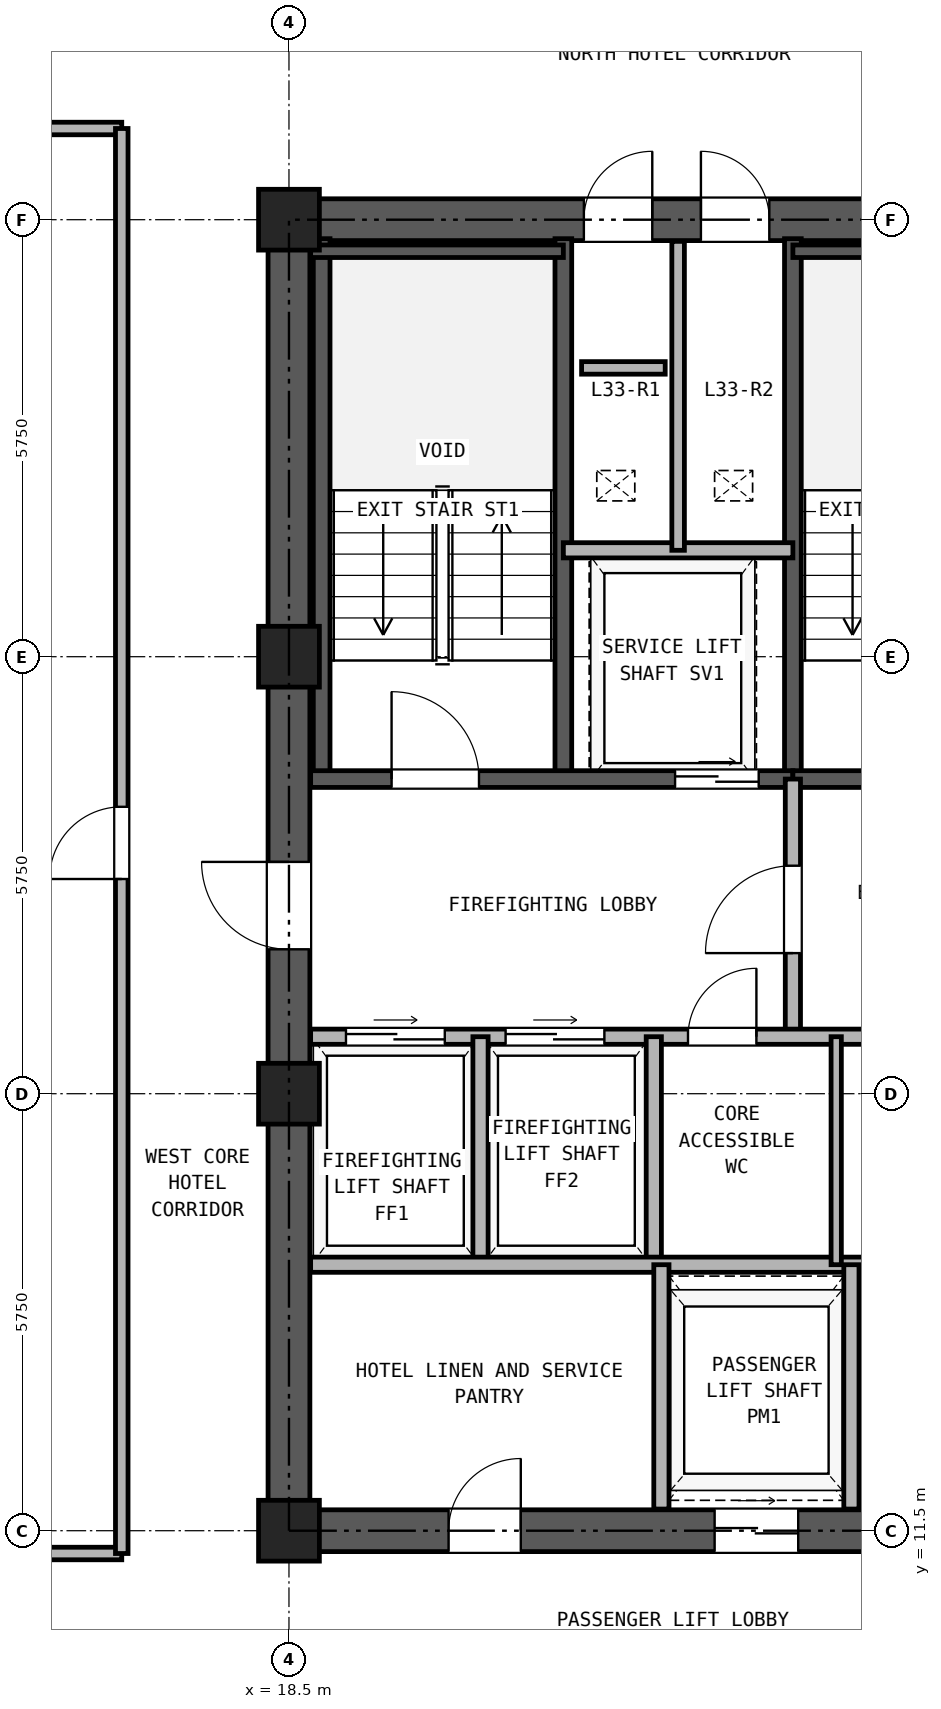
"""IFC4 building model, lengths in metres.
Left out: names, types, materials, properties, quantities, classifications, styles, units other than length and angle.
Written with IfcOpenShell. Run it as: python <this file> out.ifc"""

import sys

from ifc_helpers import new_model, si_unit, direction, frame, frame_2d, origin, origin_2d, place, context, subcontext, project, spatial, rectangle, hollow_rectangle, extrude, source, transform, mapped, element, fill, save


model = new_model("IFC4")
c1 = context("Model", 3, precision=1e-05, world=origin(), true_north=direction((0.0, 1.0)))
c2 = subcontext(c1, "Body", "Model", "MODEL_VIEW")
j1 = project(units=[si_unit("LENGTHUNIT", "METRE"), si_unit("PLANEANGLEUNIT", "RADIAN")], contexts=[c1])
p1 = place(None, origin())
s1 = spatial("IfcSite", under=j1, at=p1, CompositionType="ELEMENT")
p2 = place(p1, origin())
s2 = spatial("IfcBuilding", under=s1, at=p2, CompositionType="ELEMENT")
p3 = place(p2, frame((0.0, 0.0, 121.5)))
s3 = spatial("IfcBuildingStorey", under=s2, at=p3, CompositionType="ELEMENT", Elevation=121.5)
m1 = source(origin(), c2, "Body", "SweptSolid", [
    extrude(hollow_rectangle(XDim=0.8, YDim=0.8, WallThickness=0.045, at=origin_2d()), origin(), (0.0, 0.0, 1.0), 2.95),
])
for number, where, z_axis, x_axis in (
    (1, (18.5, 11.5, 0.0), (0.0, 0.0, 1.0), (1.0, 0.0, 0.0)),
    (2, (18.5, 17.25, 0.0), (0.0, 0.0, 1.0), (1.0, 0.0, 0.0)),
    (3, (18.5, 23.0, 0.0), (0.0, 0.0, 1.0), (1.0, 0.0, 0.0)),
    (4, (18.5, 28.75, 0.0), (0.0, 0.0, 1.0), (1.0, 0.0, 0.0)),
):
    element("IfcColumn", number, at=place(p3, frame(where, z_axis=z_axis, x_axis=x_axis)), inside=s3, PredefinedType="COLUMN", context=c2, shape_type="MappedRepresentation", body=[
        mapped(m1, transform((0.0, 0.0, 0.0), x_axis=(1.0, 0.0, 0.0), y_axis=(0.0, 1.0, 0.0), z_axis=(0.0, 0.0, 1.0), scale=1.0)),
    ])
p4 = place(p3, frame((18.225, 11.5, 0.0), z_axis=(0.0, 0.0, 1.0), x_axis=(1.0, 0.0, 0.0)))
e5 = element("IfcWall", 5, at=p4, inside=s3, PredefinedType="SHEAR", context=c2, shape_type="SweptSolid", body=[
    extrude(rectangle(XDim=10.55, YDim=0.55, at=frame_2d((5.275, 0.0))), origin(), (0.0, 0.0, 1.0), 2.95),
])
p5 = place(p4, frame((2.375, 0.0, 0.0)))
e6 = element("IfcOpeningElement", 6, at=p5, cuts=e5, PredefinedType="OPENING", context=c2, shape_type="SweptSolid", body=[
    extrude(rectangle(XDim=0.95, YDim=2.15, at=frame_2d((0.475, 1.075))), frame((0.0, 0.285, 0.0), z_axis=(0.0, -1.0, 0.0), x_axis=(1.0, 0.0, 0.0)), (0.0, 0.0, 1.0), 0.57),
])
p6 = place(p4, frame((5.875, 0.0, 0.0)))
e7 = element("IfcOpeningElement", 7, at=p6, cuts=e5, PredefinedType="OPENING", context=c2, shape_type="SweptSolid", body=[
    extrude(rectangle(XDim=1.1, YDim=2.25, at=frame_2d((0.55, 1.125))), frame((0.0, 0.285, 0.0), z_axis=(0.0, -1.0, 0.0), x_axis=(1.0, 0.0, 0.0)), (0.0, 0.0, 1.0), 0.57),
])
p7 = place(p4, frame((8.275, 0.0, 0.0)))
e8 = element("IfcOpeningElement", 8, at=p7, cuts=e5, PredefinedType="OPENING", context=c2, shape_type="SweptSolid", body=[
    extrude(rectangle(XDim=1.1, YDim=2.25, at=frame_2d((0.55, 1.125))), frame((0.0, 0.285, 0.0), z_axis=(0.0, -1.0, 0.0), x_axis=(1.0, 0.0, 0.0)), (0.0, 0.0, 1.0), 0.57),
])
p8 = place(p3, frame((18.225, 28.75, 0.0), z_axis=(0.0, 0.0, 1.0), x_axis=(1.0, 0.0, 0.0)))
e9 = element("IfcWall", 9, at=p8, inside=s3, PredefinedType="SHEAR", context=c2, shape_type="SweptSolid", body=[
    extrude(rectangle(XDim=10.55, YDim=0.55, at=frame_2d((5.275, 0.0))), origin(), (0.0, 0.0, 1.0), 2.95),
])
p9 = place(p8, frame((4.155, 0.0, 0.0)))
e10 = element("IfcOpeningElement", 10, at=p9, cuts=e9, PredefinedType="OPENING", context=c2, shape_type="SweptSolid", body=[
    extrude(rectangle(XDim=0.9, YDim=2.05, at=frame_2d((0.45, 1.025))), frame((0.0, 0.285, 0.0), z_axis=(0.0, -1.0, 0.0), x_axis=(1.0, 0.0, 0.0)), (0.0, 0.0, 1.0), 0.57),
])
p10 = place(p8, frame((5.695, 0.0, 0.0)))
e11 = element("IfcOpeningElement", 11, at=p10, cuts=e9, PredefinedType="OPENING", context=c2, shape_type="SweptSolid", body=[
    extrude(rectangle(XDim=0.9, YDim=2.05, at=frame_2d((0.45, 1.025))), frame((0.0, 0.285, 0.0), z_axis=(0.0, -1.0, 0.0), x_axis=(1.0, 0.0, 0.0)), (0.0, 0.0, 1.0), 0.57),
])
p11 = place(p3, frame((18.5, 11.775, 0.0), z_axis=(0.0, 0.0, 1.0), x_axis=(0.0, 1.0, 0.0)))
e12 = element("IfcWall", 12, at=p11, inside=s3, PredefinedType="SHEAR", context=c2, shape_type="SweptSolid", body=[
    extrude(rectangle(XDim=16.7, YDim=0.55, at=frame_2d((8.35, 0.0))), origin(), (0.0, 0.0, 1.0), 2.95),
])
p12 = place(p11, frame((7.375, 0.0, 0.0)))
e13 = element("IfcOpeningElement", 13, at=p12, cuts=e12, PredefinedType="OPENING", context=c2, shape_type="SweptSolid", body=[
    extrude(rectangle(XDim=1.15, YDim=2.2, at=frame_2d((0.575, 1.1))), frame((0.0, 0.285, 0.0), z_axis=(0.0, -1.0, 0.0), x_axis=(1.0, 0.0, 0.0)), (0.0, 0.0, 1.0), 0.57),
])
for number, where, z_axis, x_axis in (
    (14, (18.93, 21.39, 0.0), (0.0, 0.0, 1.0), (0.0, 1.0, 0.0)),
    (15, (22.11, 21.39, 0.0), (0.0, 0.0, 1.0), (0.0, 1.0, 0.0)),
    (16, (25.13, 21.39, 0.0), (0.0, 0.0, 1.0), (0.0, 1.0, 0.0)),
):
    element("IfcWall", number, at=place(p3, frame(where, z_axis=z_axis, x_axis=x_axis)), inside=s3, PredefinedType="SOLIDWALL", context=c2, shape_type="SweptSolid", body=[
        extrude(rectangle(XDim=7.11, YDim=0.22, at=frame_2d((3.555, 0.0))), origin(), (0.0, 0.0, 1.0), 2.95),
    ])
p13 = place(p3, frame((18.785, 28.335, 0.0), z_axis=(0.0, 0.0, 1.0), x_axis=(1.0, 0.0, 0.0)))
e17 = element("IfcWall", 17, at=p13, inside=s3, PredefinedType="PARTITIONING", context=c2, shape_type="SweptSolid", body=[
    extrude(rectangle(XDim=3.325, YDim=0.165, at=frame_2d((1.663, 0.0))), origin(), (0.0, 0.0, 1.0), 2.95),
])
p14 = place(p3, frame((25.13, 28.335, 0.0), z_axis=(0.0, 0.0, 1.0), x_axis=(1.0, 0.0, 0.0)))
e18 = element("IfcWall", 18, at=p14, inside=s3, PredefinedType="PARTITIONING", context=c2, shape_type="SweptSolid", body=[
    extrude(rectangle(XDim=3.085, YDim=0.165, at=frame_2d((1.542, 0.0))), origin(), (0.0, 0.0, 1.0), 2.95),
])
p15 = place(p3, frame((18.785, 21.39, 0.0), z_axis=(0.0, 0.0, 1.0), x_axis=(1.0, 0.0, 0.0)))
e19 = element("IfcWall", 19, at=p15, inside=s3, PredefinedType="SOLIDWALL", context=c2, shape_type="SweptSolid", body=[
    extrude(rectangle(XDim=6.345, YDim=0.22, at=frame_2d((3.172, 0.0))), origin(), (0.0, 0.0, 1.0), 2.95),
])
p16 = place(p15, frame((1.065, 0.0, 0.0)))
e20 = element("IfcOpeningElement", 20, at=p16, cuts=e19, PredefinedType="OPENING", context=c2, shape_type="SweptSolid", body=[
    extrude(rectangle(XDim=1.15, YDim=2.2, at=frame_2d((0.575, 1.1))), frame((0.0, 0.12, 0.0), z_axis=(0.0, -1.0, 0.0), x_axis=(1.0, 0.0, 0.0)), (0.0, 0.0, 1.0), 0.24),
])
p17 = place(p15, frame((4.795, 0.0, 0.0)))
e21 = element("IfcOpeningElement", 21, at=p17, cuts=e19, PredefinedType="OPENING", context=c2, shape_type="SweptSolid", body=[
    extrude(rectangle(XDim=1.1, YDim=2.25, at=frame_2d((0.55, 1.125))), frame((0.0, 0.12, 0.0), z_axis=(0.0, -1.0, 0.0), x_axis=(1.0, 0.0, 0.0)), (0.0, 0.0, 1.0), 0.24),
])
p18 = place(p3, frame((25.13, 21.39, 0.0), z_axis=(0.0, 0.0, 1.0), x_axis=(1.0, 0.0, 0.0)))
e22 = element("IfcWall", 22, at=p18, inside=s3, PredefinedType="SOLIDWALL", context=c2, shape_type="SweptSolid", body=[
    extrude(rectangle(XDim=3.085, YDim=0.22, at=frame_2d((1.542, 0.0))), origin(), (0.0, 0.0, 1.0), 2.95),
])
p19 = place(p18, frame((0.92, 0.0, 0.0)))
e23 = element("IfcOpeningElement", 23, at=p19, cuts=e22, PredefinedType="OPENING", context=c2, shape_type="SweptSolid", body=[
    extrude(rectangle(XDim=1.15, YDim=2.2, at=frame_2d((0.575, 1.1))), frame((0.0, 0.12, 0.0), z_axis=(0.0, -1.0, 0.0), x_axis=(1.0, 0.0, 0.0)), (0.0, 0.0, 1.0), 0.24),
])
p20 = place(p3, frame((22.11, 24.4, 0.0), z_axis=(0.0, 0.0, 1.0), x_axis=(1.0, 0.0, 0.0)))
e24 = element("IfcWall", 24, at=p20, inside=s3, PredefinedType="PARTITIONING", context=c2, shape_type="SweptSolid", body=[
    extrude(rectangle(XDim=3.02, YDim=0.2, at=frame_2d((1.51, 0.0))), origin(), (0.0, 0.0, 1.0), 2.95),
])
p21 = place(p3, frame((23.62, 24.4, 0.0), z_axis=(0.0, 0.0, 1.0), x_axis=(0.0, 1.0, 0.0)))
e25 = element("IfcWall", 25, at=p21, inside=s3, PredefinedType="PARTITIONING", context=c2, shape_type="SweptSolid", body=[
    extrude(rectangle(XDim=4.065, YDim=0.165, at=frame_2d((2.033, 0.0))), origin(), (0.0, 0.0, 1.0), 2.95),
])
p22 = place(p3, frame((25.13, 18.0, 0.0), z_axis=(0.0, 0.0, 1.0), x_axis=(0.0, 1.0, 0.0)))
e26 = element("IfcWall", 26, at=p22, inside=s3, PredefinedType="PARTITIONING", context=c2, shape_type="SweptSolid", body=[
    extrude(rectangle(XDim=3.39, YDim=0.2, at=frame_2d((1.695, 0.0))), origin(), (0.0, 0.0, 1.0), 2.95),
])
p23 = place(p22, frame((1.1, 0.0, 0.0)))
e27 = element("IfcOpeningElement", 27, at=p23, cuts=e26, PredefinedType="OPENING", context=c2, shape_type="SweptSolid", body=[
    extrude(rectangle(XDim=1.15, YDim=2.2, at=frame_2d((0.575, 1.1))), frame((0.0, 0.11, 0.0), z_axis=(0.0, -1.0, 0.0), x_axis=(1.0, 0.0, 0.0)), (0.0, 0.0, 1.0), 0.22),
])
p24 = place(p3, frame((18.785, 18.0, 0.0), z_axis=(0.0, 0.0, 1.0), x_axis=(1.0, 0.0, 0.0)))
e28 = element("IfcWall", 28, at=p24, inside=s3, PredefinedType="PARTITIONING", context=c2, shape_type="SweptSolid", body=[
    extrude(rectangle(XDim=9.43, YDim=0.2, at=frame_2d((4.715, 0.0))), origin(), (0.0, 0.0, 1.0), 2.95),
])
p25 = place(p24, frame((0.465, 0.0, 0.0)))
e29 = element("IfcOpeningElement", 29, at=p25, cuts=e28, PredefinedType="OPENING", context=c2, shape_type="SweptSolid", body=[
    extrude(rectangle(XDim=1.3, YDim=2.3, at=frame_2d((0.65, 1.15))), frame((0.0, 0.11, 0.0), z_axis=(0.0, -1.0, 0.0), x_axis=(1.0, 0.0, 0.0)), (0.0, 0.0, 1.0), 0.22),
])
p26 = place(p24, frame((2.565, 0.0, 0.0)))
e30 = element("IfcOpeningElement", 30, at=p26, cuts=e28, PredefinedType="OPENING", context=c2, shape_type="SweptSolid", body=[
    extrude(rectangle(XDim=1.3, YDim=2.3, at=frame_2d((0.65, 1.15))), frame((0.0, 0.11, 0.0), z_axis=(0.0, -1.0, 0.0), x_axis=(1.0, 0.0, 0.0)), (0.0, 0.0, 1.0), 0.22),
])
p27 = place(p24, frame((4.965, 0.0, 0.0)))
e31 = element("IfcOpeningElement", 31, at=p27, cuts=e28, PredefinedType="OPENING", context=c2, shape_type="SweptSolid", body=[
    extrude(rectangle(XDim=0.9, YDim=2.05, at=frame_2d((0.45, 1.025))), frame((0.0, 0.11, 0.0), z_axis=(0.0, -1.0, 0.0), x_axis=(1.0, 0.0, 0.0)), (0.0, 0.0, 1.0), 0.22),
])
p28 = place(p24, frame((7.665, 0.0, 0.0)))
e32 = element("IfcOpeningElement", 32, at=p28, cuts=e28, PredefinedType="OPENING", context=c2, shape_type="SweptSolid", body=[
    extrude(rectangle(XDim=0.9, YDim=2.05, at=frame_2d((0.45, 1.025))), frame((0.0, 0.11, 0.0), z_axis=(0.0, -1.0, 0.0), x_axis=(1.0, 0.0, 0.0)), (0.0, 0.0, 1.0), 0.22),
])
for number, where, z_axis, x_axis in (
    (33, (21.02, 15.0, 0.0), (0.0, 0.0, 1.0), (0.0, 1.0, 0.0)),
    (34, (23.3, 15.0, 0.0), (0.0, 0.0, 1.0), (0.0, 1.0, 0.0)),
):
    element("IfcWall", number, at=place(p3, frame(where, z_axis=z_axis, x_axis=x_axis)), inside=s3, PredefinedType="PARTITIONING", context=c2, shape_type="SweptSolid", body=[
        extrude(rectangle(XDim=3.0, YDim=0.2, at=frame_2d((1.5, 0.0))), origin(), (0.0, 0.0, 1.0), 2.95),
    ])
p29 = place(p3, frame((18.785, 15.0, 0.0), z_axis=(0.0, 0.0, 1.0), x_axis=(1.0, 0.0, 0.0)))
e35 = element("IfcWall", 35, at=p29, inside=s3, PredefinedType="PARTITIONING", context=c2, shape_type="SweptSolid", body=[
    extrude(rectangle(XDim=9.43, YDim=0.2, at=frame_2d((4.715, 0.0))), origin(), (0.0, 0.0, 1.0), 2.95),
])
p30 = place(p3, frame((25.7, 15.0, 0.0), z_axis=(0.0, 0.0, 1.0), x_axis=(0.0, 1.0, 0.0)))
e36 = element("IfcWall", 36, at=p30, inside=s3, PredefinedType="PARTITIONING", context=c2, shape_type="SweptSolid", body=[
    extrude(rectangle(XDim=3.0, YDim=0.135, at=frame_2d((1.5, 0.0))), origin(), (0.0, 0.0, 1.0), 2.95),
])
for number, where, z_axis, x_axis in (
    (37, (23.4, 11.785, 0.0), (0.0, 0.0, 1.0), (0.0, 1.0, 0.0)),
    (38, (25.9, 11.785, 0.0), (0.0, 0.0, 1.0), (0.0, 1.0, 0.0)),
):
    element("IfcWall", number, at=place(p3, frame(where, z_axis=z_axis, x_axis=x_axis)), inside=s3, PredefinedType="PARTITIONING", context=c2, shape_type="SweptSolid", body=[
        extrude(rectangle(XDim=3.215, YDim=0.2, at=frame_2d((1.607, 0.0))), origin(), (0.0, 0.0, 1.0), 2.95),
    ])
for number, where, z_axis, x_axis in (
    (39, (7.2, 11.2, 0.0), (0.0, 0.0, 1.0), (1.0, 0.0, 0.0)),
    (40, (7.2, 29.95, 0.0), (0.0, 0.0, 1.0), (1.0, 0.0, 0.0)),
):
    element("IfcWall", number, at=place(p3, frame(where, z_axis=z_axis, x_axis=x_axis)), inside=s3, PredefinedType="PARTITIONING", context=c2, shape_type="SweptSolid", body=[
        extrude(rectangle(XDim=9.1, YDim=0.165, at=frame_2d((4.55, 0.0))), origin(), (0.0, 0.0, 1.0), 2.95),
    ])
p31 = place(p3, frame((16.3, 11.2, 0.0), z_axis=(0.0, 0.0, 1.0), x_axis=(0.0, 1.0, 0.0)))
e41 = element("IfcWall", 41, at=p31, inside=s3, PredefinedType="PARTITIONING", context=c2, shape_type="SweptSolid", body=[
    extrude(rectangle(XDim=18.75, YDim=0.165, at=frame_2d((9.375, 0.0))), origin(), (0.0, 0.0, 1.0), 2.95),
])
p32 = place(p31, frame((8.875, 0.0, 0.0)))
e42 = element("IfcOpeningElement", 42, at=p32, cuts=e41, PredefinedType="OPENING", context=c2, shape_type="SweptSolid", body=[
    extrude(rectangle(XDim=0.95, YDim=2.15, at=frame_2d((0.475, 1.075))), frame((0.0, 0.093, 0.0), z_axis=(0.0, -1.0, 0.0), x_axis=(1.0, 0.0, 0.0)), (0.0, 0.0, 1.0), 0.185),
])
p33 = place(p3, frame((22.35, 26.8, 0.0), z_axis=(0.0, 0.0, 1.0), x_axis=(1.0, 0.0, 0.0)))
e43 = element("IfcWall", 43, at=p33, inside=s3, PredefinedType="PARTITIONING", context=c2, shape_type="SweptSolid", body=[
    extrude(rectangle(XDim=1.1, YDim=0.165, at=frame_2d((0.55, 0.0))), origin(), (0.0, 0.0, 1.0), 2.95),
])
p34 = place(p16, frame((1.15, 0.0, 0.0), z_axis=(0.0, 0.0, 1.0), x_axis=(-1.0, 0.0, 0.0)))
e44 = element("IfcDoor", 44, at=p34, inside=s3, OperationType="SINGLE_SWING_LEFT", PredefinedType="DOOR", context=c2, shape_type="SweptSolid", body=[
    extrude(rectangle(XDim=1.15, YDim=2.2, at=frame_2d((0.575, 1.1))), frame((0.0, 0.025, 0.0), z_axis=(0.0, -1.0, 0.0), x_axis=(1.0, 0.0, 0.0)), (0.0, 0.0, 1.0), 0.05),
])
fill(e20, e44)
p35 = place(p17, frame((1.1, 0.0, 0.0), z_axis=(0.0, 0.0, 1.0), x_axis=(-1.0, 0.0, 0.0)))
e45 = element("IfcDoor", 45, at=p35, inside=s3, OperationType="DOUBLE_DOOR_SLIDING", PredefinedType="DOOR", context=c2, shape_type="SweptSolid", body=[
    extrude(rectangle(XDim=1.1, YDim=2.25, at=frame_2d((0.55, 1.125))), frame((0.0, 0.025, 0.0), z_axis=(0.0, -1.0, 0.0), x_axis=(1.0, 0.0, 0.0)), (0.0, 0.0, 1.0), 0.05),
])
fill(e21, e45)
p36 = place(p23, origin())
e46 = element("IfcDoor", 46, at=p36, inside=s3, OperationType="SINGLE_SWING_LEFT", PredefinedType="DOOR", context=c2, shape_type="SweptSolid", body=[
    extrude(rectangle(XDim=1.15, YDim=2.2, at=frame_2d((0.575, 1.1))), frame((0.0, 0.025, 0.0), z_axis=(0.0, -1.0, 0.0), x_axis=(1.0, 0.0, 0.0)), (0.0, 0.0, 1.0), 0.05),
])
fill(e27, e46)
p37 = place(p25, origin())
e47 = element("IfcDoor", 47, at=p37, inside=s3, OperationType="DOUBLE_DOOR_SLIDING", PredefinedType="DOOR", context=c2, shape_type="SweptSolid", body=[
    extrude(rectangle(XDim=1.3, YDim=2.3, at=frame_2d((0.65, 1.15))), frame((0.0, 0.025, 0.0), z_axis=(0.0, -1.0, 0.0), x_axis=(1.0, 0.0, 0.0)), (0.0, 0.0, 1.0), 0.05),
])
fill(e29, e47)
p38 = place(p26, origin())
e48 = element("IfcDoor", 48, at=p38, inside=s3, OperationType="DOUBLE_DOOR_SLIDING", PredefinedType="DOOR", context=c2, shape_type="SweptSolid", body=[
    extrude(rectangle(XDim=1.3, YDim=2.3, at=frame_2d((0.65, 1.15))), frame((0.0, 0.025, 0.0), z_axis=(0.0, -1.0, 0.0), x_axis=(1.0, 0.0, 0.0)), (0.0, 0.0, 1.0), 0.05),
])
fill(e30, e48)
p39 = place(p27, frame((0.9, 0.0, 0.0), z_axis=(0.0, 0.0, 1.0), x_axis=(-1.0, 0.0, 0.0)))
e49 = element("IfcDoor", 49, at=p39, inside=s3, OperationType="SINGLE_SWING_RIGHT", PredefinedType="DOOR", context=c2, shape_type="SweptSolid", body=[
    extrude(rectangle(XDim=0.9, YDim=2.05, at=frame_2d((0.45, 1.025))), frame((0.0, 0.025, 0.0), z_axis=(0.0, -1.0, 0.0), x_axis=(1.0, 0.0, 0.0)), (0.0, 0.0, 1.0), 0.05),
])
fill(e31, e49)
p40 = place(p12, frame((1.15, 0.0, 0.0), z_axis=(0.0, 0.0, 1.0), x_axis=(-1.0, 0.0, 0.0)))
e50 = element("IfcDoor", 50, at=p40, inside=s3, OperationType="SINGLE_SWING_RIGHT", PredefinedType="DOOR", context=c2, shape_type="SweptSolid", body=[
    extrude(rectangle(XDim=1.15, YDim=2.2, at=frame_2d((0.575, 1.1))), frame((0.0, 0.025, 0.0), z_axis=(0.0, -1.0, 0.0), x_axis=(1.0, 0.0, 0.0)), (0.0, 0.0, 1.0), 0.05),
])
fill(e13, e50)
p41 = place(p9, origin())
e51 = element("IfcDoor", 51, at=p41, inside=s3, OperationType="SINGLE_SWING_RIGHT", PredefinedType="DOOR", context=c2, shape_type="SweptSolid", body=[
    extrude(rectangle(XDim=0.9, YDim=2.05, at=frame_2d((0.45, 1.025))), frame((0.0, 0.025, 0.0), z_axis=(0.0, -1.0, 0.0), x_axis=(1.0, 0.0, 0.0)), (0.0, 0.0, 1.0), 0.05),
])
fill(e10, e51)
p42 = place(p10, origin())
e52 = element("IfcDoor", 52, at=p42, inside=s3, OperationType="SINGLE_SWING_LEFT", PredefinedType="DOOR", context=c2, shape_type="SweptSolid", body=[
    extrude(rectangle(XDim=0.9, YDim=2.05, at=frame_2d((0.45, 1.025))), frame((0.0, 0.025, 0.0), z_axis=(0.0, -1.0, 0.0), x_axis=(1.0, 0.0, 0.0)), (0.0, 0.0, 1.0), 0.05),
])
fill(e11, e52)
p43 = place(p5, frame((0.95, 0.0, 0.0), z_axis=(0.0, 0.0, 1.0), x_axis=(-1.0, 0.0, 0.0)))
e53 = element("IfcDoor", 53, at=p43, inside=s3, OperationType="SINGLE_SWING_RIGHT", PredefinedType="DOOR", context=c2, shape_type="SweptSolid", body=[
    extrude(rectangle(XDim=0.95, YDim=2.15, at=frame_2d((0.475, 1.075))), frame((0.0, 0.025, 0.0), z_axis=(0.0, -1.0, 0.0), x_axis=(1.0, 0.0, 0.0)), (0.0, 0.0, 1.0), 0.05),
])
fill(e6, e53)
p44 = place(p6, frame((1.1, 0.0, 0.0), z_axis=(0.0, 0.0, 1.0), x_axis=(-1.0, 0.0, 0.0)))
e54 = element("IfcDoor", 54, at=p44, inside=s3, OperationType="DOUBLE_DOOR_SLIDING", PredefinedType="DOOR", context=c2, shape_type="SweptSolid", body=[
    extrude(rectangle(XDim=1.1, YDim=2.25, at=frame_2d((0.55, 1.125))), frame((0.0, 0.025, 0.0), z_axis=(0.0, -1.0, 0.0), x_axis=(1.0, 0.0, 0.0)), (0.0, 0.0, 1.0), 0.05),
])
fill(e7, e54)
p45 = place(p32, frame((0.95, 0.0, 0.0), z_axis=(0.0, 0.0, 1.0), x_axis=(-1.0, 0.0, 0.0)))
e55 = element("IfcDoor", 55, at=p45, inside=s3, OperationType="SINGLE_SWING_LEFT", PredefinedType="DOOR", context=c2, shape_type="SweptSolid", body=[
    extrude(rectangle(XDim=0.95, YDim=2.15, at=frame_2d((0.475, 1.075))), frame((0.0, 0.025, 0.0), z_axis=(0.0, -1.0, 0.0), x_axis=(1.0, 0.0, 0.0)), (0.0, 0.0, 1.0), 0.05),
])
fill(e42, e55)
save(model, sys.argv[1])
